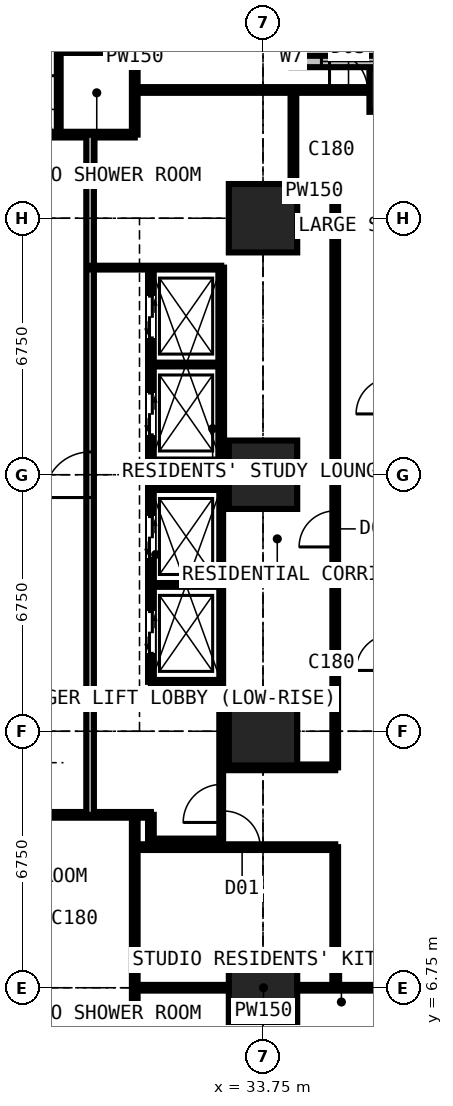
"""IFC4 building model, lengths in metres.
Left out: names, types, materials, properties, quantities, classifications, styles, units other than length and angle.
Written with IfcOpenShell. Run it as: python <this file> out.ifc"""

import sys

from ifc_helpers import new_model, si_unit, direction, frame, frame_2d, origin, origin_2d, place, context, subcontext, project, spatial, rectangle, extrude, element, fill, save


model = new_model("IFC4")
c1 = context("Model", 3, precision=1e-05, world=origin(), true_north=direction((0.0, 1.0)))
c2 = subcontext(c1, "Body", "Model", "MODEL_VIEW")
j1 = project(units=[si_unit("LENGTHUNIT", "METRE"), si_unit("PLANEANGLEUNIT", "RADIAN")], contexts=[c1])
p1 = place(None, origin())
s1 = spatial("IfcSite", under=j1, at=p1, CompositionType="ELEMENT")
p2 = place(p1, origin())
s2 = spatial("IfcBuilding", under=s1, at=p2, CompositionType="ELEMENT")
p3 = place(p2, frame((0.0, 0.0, 87.3)))
s3 = spatial("IfcBuildingStorey", under=s2, at=p3, CompositionType="ELEMENT", Elevation=87.3)
for number, where, z_axis, x_axis in (
    (1, (33.75, 6.75, 0.0), (0.0, 0.0, 1.0), (1.0, 0.0, 0.0)),
    (2, (33.75, 13.5, 0.0), (0.0, 0.0, 1.0), (1.0, 0.0, 0.0)),
    (3, (33.75, 20.25, 0.0), (0.0, 0.0, 1.0), (1.0, 0.0, 0.0)),
    (4, (33.75, 27.0, 0.0), (0.0, 0.0, 1.0), (1.0, 0.0, 0.0)),
):
    element("IfcColumn", number, at=place(p3, frame(where, z_axis=z_axis, x_axis=x_axis)), inside=s3, PredefinedType="COLUMN", context=c2, shape_type="SweptSolid", body=[
        extrude(rectangle(XDim=1.8, YDim=1.8, at=origin_2d()), origin(), (0.0, 0.0, 1.0), 3.6),
    ])
p4 = place(p3, frame((37.125, 30.375, 0.0), z_axis=(0.0, 0.0, 1.0), x_axis=(1.0, 0.0, 0.0)))
e5 = element("IfcColumn", 5, at=p4, inside=s3, PredefinedType="COLUMN", context=c2, shape_type="SweptSolid", body=[
    extrude(rectangle(XDim=1.15, YDim=1.15, at=origin_2d()), origin(), (0.0, 0.0, 1.0), 3.6),
])
p5 = place(p3, frame((37.875, 31.125, 0.0), z_axis=(0.0, 0.0, 1.0), x_axis=(-1.0, 0.0, 0.0)))
e6 = element("IfcWall", 6, at=p5, inside=s3, PredefinedType="SOLIDWALL", context=c2, shape_type="SweptSolid", body=[
    extrude(rectangle(XDim=3.375, YDim=0.3, at=frame_2d((1.688, 0.0))), origin(), (0.0, 0.0, 1.0), 3.375),
])
p6 = place(p5, frame((0.788, 0.0, 0.6)))
e7 = element("IfcOpeningElement", 7, at=p6, cuts=e6, PredefinedType="OPENING", context=c2, shape_type="SweptSolid", body=[
    extrude(rectangle(XDim=1.8, YDim=2.1, at=frame_2d((0.9, 1.05))), frame((0.0, 0.16, 0.0), z_axis=(0.0, -1.0, 0.0), x_axis=(1.0, 0.0, 0.0)), (0.0, 0.0, 1.0), 0.32),
])
p7 = place(p3, frame((34.5, 31.125, 0.0), z_axis=(0.0, 0.0, 1.0), x_axis=(0.0, 1.0, 0.0)))
e8 = element("IfcWall", 8, at=p7, inside=s3, PredefinedType="SOLIDWALL", context=c2, shape_type="SweptSolid", body=[
    extrude(rectangle(XDim=3.375, YDim=0.3, at=frame_2d((1.688, 0.0))), origin(), (0.0, 0.0, 1.0), 3.375),
])
p8 = place(p7, frame((0.272, 0.0, 0.9)))
e9 = element("IfcOpeningElement", 9, at=p8, cuts=e8, PredefinedType="OPENING", context=c2, shape_type="SweptSolid", body=[
    extrude(rectangle(XDim=0.9, YDim=1.8, at=frame_2d((0.45, 0.9))), frame((0.0, 0.16, 0.0), z_axis=(0.0, -1.0, 0.0), x_axis=(1.0, 0.0, 0.0)), (0.0, 0.0, 1.0), 0.32),
])
p9 = place(p3, frame((10.125, 11.3, 0.0), z_axis=(0.0, 0.0, 1.0), x_axis=(1.0, 0.0, 0.0)))
e10 = element("IfcWall", 10, at=p9, inside=s3, PredefinedType="PARTITIONING", context=c2, shape_type="SweptSolid", body=[
    extrude(rectangle(XDim=20.675, YDim=0.15, at=frame_2d((10.337, 0.0))), origin(), (0.0, 0.0, 1.0), 3.375),
])
p10 = place(p9, frame((8.375, 0.0, 0.0)))
e11 = element("IfcOpeningElement", 11, at=p10, cuts=e10, PredefinedType="OPENING", context=c2, shape_type="SweptSolid", body=[
    extrude(rectangle(XDim=1.0, YDim=2.2, at=frame_2d((0.5, 1.1))), frame((0.0, 0.085, 0.0), z_axis=(0.0, -1.0, 0.0), x_axis=(1.0, 0.0, 0.0)), (0.0, 0.0, 1.0), 0.17),
])
p11 = place(p9, frame((10.975, 0.0, 0.0)))
e12 = element("IfcOpeningElement", 12, at=p11, cuts=e10, PredefinedType="OPENING", context=c2, shape_type="SweptSolid", body=[
    extrude(rectangle(XDim=1.0, YDim=2.2, at=frame_2d((0.5, 1.1))), frame((0.0, 0.085, 0.0), z_axis=(0.0, -1.0, 0.0), x_axis=(1.0, 0.0, 0.0)), (0.0, 0.0, 1.0), 0.17),
])
p12 = place(p9, frame((3.925, 0.0, 0.0)))
e13 = element("IfcOpeningElement", 13, at=p12, cuts=e10, PredefinedType="OPENING", context=c2, shape_type="SweptSolid", body=[
    extrude(rectangle(XDim=0.95, YDim=2.2, at=frame_2d((0.475, 1.1))), frame((0.0, 0.085, 0.0), z_axis=(0.0, -1.0, 0.0), x_axis=(1.0, 0.0, 0.0)), (0.0, 0.0, 1.0), 0.17),
])
p13 = place(p3, frame((11.3, 29.2, 0.0), z_axis=(0.0, 0.0, 1.0), x_axis=(1.0, 0.0, 0.0)))
e14 = element("IfcWall", 14, at=p13, inside=s3, PredefinedType="PARTITIONING", context=c2, shape_type="SweptSolid", body=[
    extrude(rectangle(XDim=19.075, YDim=0.15, at=frame_2d((9.538, 0.0))), origin(), (0.0, 0.0, 1.0), 3.375),
])
p14 = place(p13, frame((5.825, 0.0, 0.0)))
e15 = element("IfcOpeningElement", 15, at=p14, cuts=e14, PredefinedType="OPENING", context=c2, shape_type="SweptSolid", body=[
    extrude(rectangle(XDim=0.95, YDim=2.2, at=frame_2d((0.475, 1.1))), frame((0.0, 0.085, 0.0), z_axis=(0.0, -1.0, 0.0), x_axis=(1.0, 0.0, 0.0)), (0.0, 0.0, 1.0), 0.17),
])
p15 = place(p13, frame((9.2, 0.0, 0.0)))
e16 = element("IfcOpeningElement", 16, at=p15, cuts=e14, PredefinedType="OPENING", context=c2, shape_type="SweptSolid", body=[
    extrude(rectangle(XDim=0.95, YDim=2.2, at=frame_2d((0.475, 1.1))), frame((0.0, 0.085, 0.0), z_axis=(0.0, -1.0, 0.0), x_axis=(1.0, 0.0, 0.0)), (0.0, 0.0, 1.0), 0.17),
])
p16 = place(p13, frame((12.575, 0.0, 0.0)))
e17 = element("IfcOpeningElement", 17, at=p16, cuts=e14, PredefinedType="OPENING", context=c2, shape_type="SweptSolid", body=[
    extrude(rectangle(XDim=0.95, YDim=2.2, at=frame_2d((0.475, 1.1))), frame((0.0, 0.085, 0.0), z_axis=(0.0, -1.0, 0.0), x_axis=(1.0, 0.0, 0.0)), (0.0, 0.0, 1.0), 0.17),
])
p17 = place(p13, frame((15.95, 0.0, 0.0)))
e18 = element("IfcOpeningElement", 18, at=p17, cuts=e14, PredefinedType="OPENING", context=c2, shape_type="SweptSolid", body=[
    extrude(rectangle(XDim=0.95, YDim=2.2, at=frame_2d((0.475, 1.1))), frame((0.0, 0.085, 0.0), z_axis=(0.0, -1.0, 0.0), x_axis=(1.0, 0.0, 0.0)), (0.0, 0.0, 1.0), 0.17),
])
p18 = place(p13, frame((0.6, 0.0, 0.0)))
e19 = element("IfcOpeningElement", 19, at=p18, cuts=e14, PredefinedType="OPENING", context=c2, shape_type="SweptSolid", body=[
    extrude(rectangle(XDim=1.0, YDim=2.2, at=frame_2d((0.5, 1.1))), frame((0.0, 0.085, 0.0), z_axis=(0.0, -1.0, 0.0), x_axis=(1.0, 0.0, 0.0)), (0.0, 0.0, 1.0), 0.17),
])
p19 = place(p3, frame((27.725, 5.95, 0.0), z_axis=(0.0, 0.0, 1.0), x_axis=(1.0, 0.0, 0.0)))
e20 = element("IfcWall", 20, at=p19, inside=s3, PredefinedType="PARTITIONING", context=c2, shape_type="SweptSolid", body=[
    extrude(rectangle(XDim=2.65, YDim=0.15, at=frame_2d((1.325, 0.0))), origin(), (0.0, 0.0, 1.0), 3.375),
])
p20 = place(p3, frame((28.375, 29.2, 0.0), z_axis=(0.0, 0.0, 1.0), x_axis=(0.0, 1.0, 0.0)))
e21 = element("IfcWall", 21, at=p20, inside=s3, PredefinedType="PARTITIONING", context=c2, shape_type="SweptSolid", body=[
    extrude(rectangle(XDim=2.2, YDim=0.1, at=frame_2d((1.1, 0.0))), origin(), (0.0, 0.0, 1.0), 3.375),
])
p21 = place(p20, frame((0.65, 0.0, 0.0)))
e22 = element("IfcOpeningElement", 22, at=p21, cuts=e21, PredefinedType="OPENING", context=c2, shape_type="SweptSolid", body=[
    extrude(rectangle(XDim=0.9, YDim=2.2, at=frame_2d((0.45, 1.1))), frame((0.0, 0.06, 0.0), z_axis=(0.0, -1.0, 0.0), x_axis=(1.0, 0.0, 0.0)), (0.0, 0.0, 1.0), 0.12),
])
p22 = place(p3, frame((28.375, 31.4, 0.0), z_axis=(0.0, 0.0, 1.0), x_axis=(1.0, 0.0, 0.0)))
e23 = element("IfcWall", 23, at=p22, inside=s3, PredefinedType="PARTITIONING", context=c2, shape_type="SweptSolid", body=[
    extrude(rectangle(XDim=2.0, YDim=0.1, at=frame_2d((1.0, 0.0))), origin(), (0.0, 0.0, 1.0), 3.375),
])
p23 = place(p3, frame((29.2, 11.3, 0.0), z_axis=(0.0, 0.0, 1.0), x_axis=(0.0, 1.0, 0.0)))
e24 = element("IfcWall", 24, at=p23, inside=s3, PredefinedType="PARTITIONING", context=c2, shape_type="SweptSolid", body=[
    extrude(rectangle(XDim=17.9, YDim=0.2, at=frame_2d((8.95, 0.0))), origin(), (0.0, 0.0, 1.0), 3.375),
])
p24 = place(p23, frame((8.35, 0.0, 0.0)))
e25 = element("IfcOpeningElement", 25, at=p24, cuts=e24, PredefinedType="OPENING", context=c2, shape_type="SweptSolid", body=[
    extrude(rectangle(XDim=1.2, YDim=2.2, at=frame_2d((0.6, 1.1))), frame((0.0, 0.11, 0.0), z_axis=(0.0, -1.0, 0.0), x_axis=(1.0, 0.0, 0.0)), (0.0, 0.0, 1.0), 0.22),
])
p25 = place(p3, frame((29.2, 25.7, 0.0), z_axis=(0.0, 0.0, 1.0), x_axis=(1.0, 0.0, 0.0)))
e26 = element("IfcWall", 26, at=p25, inside=s3, PredefinedType="SHEAR", context=c2, shape_type="SweptSolid", body=[
    extrude(rectangle(XDim=3.45, YDim=0.1, at=frame_2d((1.725, 0.0))), origin(), (0.0, 0.0, 1.0), 3.375),
])
p26 = place(p3, frame((30.375, -0.734, 0.0), z_axis=(0.0, 0.0, 1.0), x_axis=(0.0, 1.0, 0.0)))
e27 = element("IfcWall", 27, at=p26, inside=s3, PredefinedType="PARTITIONING", context=c2, shape_type="SweptSolid", body=[
    extrude(rectangle(XDim=12.034, YDim=0.15, at=frame_2d((6.017, 0.0))), origin(), (0.0, 0.0, 1.0), 3.375),
])
p27 = place(p26, frame((4.884, 0.0, 0.0)))
e28 = element("IfcOpeningElement", 28, at=p27, cuts=e27, PredefinedType="OPENING", context=c2, shape_type="SweptSolid", body=[
    extrude(rectangle(XDim=1.0, YDim=2.2, at=frame_2d((0.5, 1.1))), frame((0.0, 0.085, 0.0), z_axis=(0.0, -1.0, 0.0), x_axis=(1.0, 0.0, 0.0)), (0.0, 0.0, 1.0), 0.17),
])
p28 = place(p3, frame((30.375, 6.75, 0.0), z_axis=(0.0, 0.0, 1.0), x_axis=(1.0, 0.0, 0.0)))
e29 = element("IfcWall", 29, at=p28, inside=s3, PredefinedType="PARTITIONING", context=c2, shape_type="SweptSolid", body=[
    extrude(rectangle(XDim=6.775, YDim=0.15, at=frame_2d((3.387, 0.0))), origin(), (0.0, 0.0, 1.0), 2.877),
])
p29 = place(p3, frame((30.375, 10.45, 0.0), z_axis=(0.0, 0.0, 1.0), x_axis=(1.0, 0.0, 0.0)))
e30 = element("IfcWall", 30, at=p29, inside=s3, PredefinedType="PARTITIONING", context=c2, shape_type="SweptSolid", body=[
    extrude(rectangle(XDim=5.275, YDim=0.15, at=frame_2d((2.637, 0.0))), origin(), (0.0, 0.0, 1.0), 3.375),
])
p30 = place(p29, frame((2.35, 0.0, 0.0)))
e31 = element("IfcOpeningElement", 31, at=p30, cuts=e30, PredefinedType="OPENING", context=c2, shape_type="SweptSolid", body=[
    extrude(rectangle(XDim=0.95, YDim=2.2, at=frame_2d((0.475, 1.1))), frame((0.0, 0.085, 0.0), z_axis=(0.0, -1.0, 0.0), x_axis=(1.0, 0.0, 0.0)), (0.0, 0.0, 1.0), 0.17),
])
p31 = place(p3, frame((30.375, 29.2, 0.0), z_axis=(0.0, 0.0, 1.0), x_axis=(0.0, 1.0, 0.0)))
e32 = element("IfcWall", 32, at=p31, inside=s3, PredefinedType="PARTITIONING", context=c2, shape_type="SweptSolid", body=[
    extrude(rectangle(XDim=5.284, YDim=0.15, at=frame_2d((2.642, 0.0))), origin(), (0.0, 0.0, 1.0), 3.375),
])
p32 = place(p3, frame((30.375, 30.375, 0.0), z_axis=(0.0, 0.0, 1.0), x_axis=(1.0, 0.0, 0.0)))
e33 = element("IfcWall", 33, at=p32, inside=s3, PredefinedType="PARTITIONING", context=c2, shape_type="SweptSolid", body=[
    extrude(rectangle(XDim=7.35, YDim=0.15, at=frame_2d((3.675, 0.0))), origin(), (0.0, 0.0, 1.0), 2.877),
])
p33 = place(p32, frame((5.125, 0.0, 0.0)))
e34 = element("IfcOpeningElement", 34, at=p33, cuts=e33, PredefinedType="OPENING", context=c2, shape_type="SweptSolid", body=[
    extrude(rectangle(XDim=1.0, YDim=2.2, at=frame_2d((0.5, 1.1))), frame((0.0, 0.085, 0.0), z_axis=(0.0, -1.0, 0.0), x_axis=(1.0, 0.0, 0.0)), (0.0, 0.0, 1.0), 0.17),
])
p34 = place(p3, frame((30.8, 10.6, 0.0), z_axis=(0.0, 0.0, 1.0), x_axis=(0.0, 1.0, 0.0)))
e35 = element("IfcWall", 35, at=p34, inside=s3, PredefinedType="PARTITIONING", context=c2, shape_type="SweptSolid", body=[
    extrude(rectangle(XDim=0.7, YDim=0.15, at=frame_2d((0.35, 0.0))), origin(), (0.0, 0.0, 1.0), 3.375),
])
p35 = place(p3, frame((30.8, 10.6, 0.0), z_axis=(0.0, 0.0, 1.0), x_axis=(1.0, 0.0, 0.0)))
e36 = element("IfcWall", 36, at=p35, inside=s3, PredefinedType="PARTITIONING", context=c2, shape_type="SweptSolid", body=[
    extrude(rectangle(XDim=1.85, YDim=0.15, at=frame_2d((0.925, 0.0))), origin(), (0.0, 0.0, 1.0), 3.375),
])
p36 = place(p3, frame((30.8, 14.8, 0.0), z_axis=(0.0, 0.0, 1.0), x_axis=(0.0, 1.0, 0.0)))
e37 = element("IfcWall", 37, at=p36, inside=s3, PredefinedType="PARTITIONING", context=c2, shape_type="SweptSolid", body=[
    extrude(rectangle(XDim=10.9, YDim=0.15, at=frame_2d((5.45, 0.0))), origin(), (0.0, 0.0, 1.0), 3.375),
])
p37 = place(p36, frame((0.75, 0.0, 0.0)))
e38 = element("IfcOpeningElement", 38, at=p37, cuts=e37, PredefinedType="OPENING", context=c2, shape_type="SweptSolid", body=[
    extrude(rectangle(XDim=1.1, YDim=2.2, at=frame_2d((0.55, 1.1))), frame((0.0, 0.085, 0.0), z_axis=(0.0, -1.0, 0.0), x_axis=(1.0, 0.0, 0.0)), (0.0, 0.0, 1.0), 0.17),
])
p38 = place(p36, frame((3.25, 0.0, 0.0)))
e39 = element("IfcOpeningElement", 39, at=p38, cuts=e37, PredefinedType="OPENING", context=c2, shape_type="SweptSolid", body=[
    extrude(rectangle(XDim=1.1, YDim=2.2, at=frame_2d((0.55, 1.1))), frame((0.0, 0.085, 0.0), z_axis=(0.0, -1.0, 0.0), x_axis=(1.0, 0.0, 0.0)), (0.0, 0.0, 1.0), 0.17),
])
p39 = place(p36, frame((6.5, 0.0, 0.0)))
e40 = element("IfcOpeningElement", 40, at=p39, cuts=e37, PredefinedType="OPENING", context=c2, shape_type="SweptSolid", body=[
    extrude(rectangle(XDim=1.1, YDim=2.2, at=frame_2d((0.55, 1.1))), frame((0.0, 0.085, 0.0), z_axis=(0.0, -1.0, 0.0), x_axis=(1.0, 0.0, 0.0)), (0.0, 0.0, 1.0), 0.17),
])
p40 = place(p36, frame((9.05, 0.0, 0.0)))
e41 = element("IfcOpeningElement", 41, at=p40, cuts=e37, PredefinedType="OPENING", context=c2, shape_type="SweptSolid", body=[
    extrude(rectangle(XDim=1.1, YDim=2.2, at=frame_2d((0.55, 1.1))), frame((0.0, 0.085, 0.0), z_axis=(0.0, -1.0, 0.0), x_axis=(1.0, 0.0, 0.0)), (0.0, 0.0, 1.0), 0.17),
])
for number, where, z_axis, x_axis in (
    (42, (30.8, 14.8, 0.0), (0.0, 0.0, 1.0), (1.0, 0.0, 0.0)),
    (43, (30.8, 17.35, 0.0), (0.0, 0.0, 1.0), (1.0, 0.0, 0.0)),
    (44, (30.8, 19.9, 0.0), (0.0, 0.0, 1.0), (1.0, 0.0, 0.0)),
    (45, (30.8, 20.6, 0.0), (0.0, 0.0, 1.0), (1.0, 0.0, 0.0)),
    (46, (30.8, 23.15, 0.0), (0.0, 0.0, 1.0), (1.0, 0.0, 0.0)),
):
    element("IfcWall", number, at=place(p3, frame(where, z_axis=z_axis, x_axis=x_axis)), inside=s3, PredefinedType="SHEAR", context=c2, shape_type="SweptSolid", body=[
        extrude(rectangle(XDim=1.85, YDim=0.1, at=frame_2d((0.925, 0.0))), origin(), (0.0, 0.0, 1.0), 3.375),
    ])
p41 = place(p3, frame((32.65, 10.6, 0.0), z_axis=(0.0, 0.0, 1.0), x_axis=(0.0, 1.0, 0.0)))
e47 = element("IfcWall", 47, at=p41, inside=s3, PredefinedType="SHEAR", context=c2, shape_type="SweptSolid", body=[
    extrude(rectangle(XDim=9.3, YDim=0.1, at=frame_2d((4.65, 0.0))), origin(), (0.0, 0.0, 1.0), 3.375),
])
p42 = place(p41, frame((0.5, 0.0, 0.0)))
e48 = element("IfcOpeningElement", 48, at=p42, cuts=e47, PredefinedType="OPENING", context=c2, shape_type="SweptSolid", body=[
    extrude(rectangle(XDim=1.0, YDim=2.2, at=frame_2d((0.5, 1.1))), frame((0.0, 0.06, 0.0), z_axis=(0.0, -1.0, 0.0), x_axis=(1.0, 0.0, 0.0)), (0.0, 0.0, 1.0), 0.12),
])
p43 = place(p3, frame((32.65, 12.55, 0.0), z_axis=(0.0, 0.0, 1.0), x_axis=(1.0, 0.0, 0.0)))
e49 = element("IfcWall", 49, at=p43, inside=s3, PredefinedType="PARTITIONING", context=c2, shape_type="SweptSolid", body=[
    extrude(rectangle(XDim=3.0, YDim=0.15, at=frame_2d((1.5, 0.0))), origin(), (0.0, 0.0, 1.0), 3.375),
])
p44 = place(p3, frame((32.65, 20.6, 0.0), z_axis=(0.0, 0.0, 1.0), x_axis=(0.0, 1.0, 0.0)))
e50 = element("IfcWall", 50, at=p44, inside=s3, PredefinedType="PARTITIONING", context=c2, shape_type="SweptSolid", body=[
    extrude(rectangle(XDim=5.1, YDim=0.15, at=frame_2d((2.55, 0.0))), origin(), (0.0, 0.0, 1.0), 3.375),
])
p45 = place(p3, frame((34.55, 27.725, 0.0), z_axis=(0.0, 0.0, 1.0), x_axis=(0.0, 1.0, 0.0)))
e51 = element("IfcWall", 51, at=p45, inside=s3, PredefinedType="PARTITIONING", context=c2, shape_type="SweptSolid", body=[
    extrude(rectangle(XDim=2.65, YDim=0.15, at=frame_2d((1.325, 0.0))), origin(), (0.0, 0.0, 1.0), 3.375),
])
p46 = place(p3, frame((34.55, 27.725, 0.0), z_axis=(0.0, 0.0, 1.0), x_axis=(1.0, 0.0, 0.0)))
e52 = element("IfcWall", 52, at=p46, inside=s3, PredefinedType="PARTITIONING", context=c2, shape_type="SweptSolid", body=[
    extrude(rectangle(XDim=1.1, YDim=0.15, at=frame_2d((0.55, 0.0))), origin(), (0.0, 0.0, 1.0), 3.375),
])
p47 = place(p3, frame((35.65, 6.75, 0.0), z_axis=(0.0, 0.0, 1.0), x_axis=(0.0, 1.0, 0.0)))
e53 = element("IfcWall", 53, at=p47, inside=s3, PredefinedType="PARTITIONING", context=c2, shape_type="SweptSolid", body=[
    extrude(rectangle(XDim=3.7, YDim=0.15, at=frame_2d((1.85, 0.0))), origin(), (0.0, 0.0, 1.0), 3.375),
])
p48 = place(p3, frame((35.65, 12.55, 0.0), z_axis=(0.0, 0.0, 1.0), x_axis=(0.0, 1.0, 0.0)))
e54 = element("IfcWall", 54, at=p48, inside=s3, PredefinedType="PARTITIONING", context=c2, shape_type="SweptSolid", body=[
    extrude(rectangle(XDim=15.175, YDim=0.15, at=frame_2d((7.587, 0.0))), origin(), (0.0, 0.0, 1.0), 3.375),
])
p49 = place(p48, frame((5.8, 0.0, 0.0)))
e55 = element("IfcOpeningElement", 55, at=p49, cuts=e54, PredefinedType="OPENING", context=c2, shape_type="SweptSolid", body=[
    extrude(rectangle(XDim=0.95, YDim=2.2, at=frame_2d((0.475, 1.1))), frame((0.0, 0.085, 0.0), z_axis=(0.0, -1.0, 0.0), x_axis=(1.0, 0.0, 0.0)), (0.0, 0.0, 1.0), 0.17),
])
p50 = place(p6, origin())
e56 = element("IfcWindow", 56, at=p50, inside=s3, PartitioningType="SINGLE_PANEL", PredefinedType="WINDOW", context=c2, shape_type="SweptSolid", body=[
    extrude(rectangle(XDim=1.8, YDim=2.1, at=frame_2d((0.9, 1.05))), frame((0.0, 0.03, 0.0), z_axis=(0.0, -1.0, 0.0), x_axis=(1.0, 0.0, 0.0)), (0.0, 0.0, 1.0), 0.06),
])
fill(e7, e56)
p51 = place(p42, origin())
e57 = element("IfcDoor", 57, at=p51, inside=s3, OperationType="SINGLE_SWING_LEFT", PredefinedType="DOOR", context=c2, shape_type="SweptSolid", body=[
    extrude(rectangle(XDim=1.0, YDim=2.2, at=frame_2d((0.5, 1.1))), frame((0.0, 0.025, 0.0), z_axis=(0.0, -1.0, 0.0), x_axis=(1.0, 0.0, 0.0)), (0.0, 0.0, 1.0), 0.05),
])
fill(e48, e57)
p52 = place(p49, origin())
e58 = element("IfcDoor", 58, at=p52, inside=s3, OperationType="SINGLE_SWING_LEFT", PredefinedType="DOOR", context=c2, shape_type="SweptSolid", body=[
    extrude(rectangle(XDim=0.95, YDim=2.2, at=frame_2d((0.475, 1.1))), frame((0.0, 0.025, 0.0), z_axis=(0.0, -1.0, 0.0), x_axis=(1.0, 0.0, 0.0)), (0.0, 0.0, 1.0), 0.05),
])
fill(e55, e58)
p53 = place(p30, origin())
e59 = element("IfcDoor", 59, at=p53, inside=s3, OperationType="SINGLE_SWING_LEFT", PredefinedType="DOOR", context=c2, shape_type="SweptSolid", body=[
    extrude(rectangle(XDim=0.95, YDim=2.2, at=frame_2d((0.475, 1.1))), frame((0.0, 0.025, 0.0), z_axis=(0.0, -1.0, 0.0), x_axis=(1.0, 0.0, 0.0)), (0.0, 0.0, 1.0), 0.05),
])
fill(e31, e59)
p54 = place(p33, origin())
e60 = element("IfcDoor", 60, at=p54, inside=s3, OperationType="SINGLE_SWING_LEFT", PredefinedType="DOOR", context=c2, shape_type="SweptSolid", body=[
    extrude(rectangle(XDim=1.0, YDim=2.2, at=frame_2d((0.5, 1.1))), frame((0.0, 0.025, 0.0), z_axis=(0.0, -1.0, 0.0), x_axis=(1.0, 0.0, 0.0)), (0.0, 0.0, 1.0), 0.05),
])
fill(e34, e60)
p55 = place(p17, origin())
e61 = element("IfcDoor", 61, at=p55, inside=s3, OperationType="SINGLE_SWING_LEFT", PredefinedType="DOOR", context=c2, shape_type="SweptSolid", body=[
    extrude(rectangle(XDim=0.95, YDim=2.2, at=frame_2d((0.475, 1.1))), frame((0.0, 0.025, 0.0), z_axis=(0.0, -1.0, 0.0), x_axis=(1.0, 0.0, 0.0)), (0.0, 0.0, 1.0), 0.05),
])
fill(e18, e61)
p56 = place(p21, origin())
e62 = element("IfcDoor", 62, at=p56, inside=s3, OperationType="SINGLE_SWING_RIGHT", PredefinedType="DOOR", context=c2, shape_type="SweptSolid", body=[
    extrude(rectangle(XDim=0.9, YDim=2.2, at=frame_2d((0.45, 1.1))), frame((0.0, 0.025, 0.0), z_axis=(0.0, -1.0, 0.0), x_axis=(1.0, 0.0, 0.0)), (0.0, 0.0, 1.0), 0.05),
])
fill(e22, e62)
p57 = place(p37, origin())
e63 = element("IfcDoor", 63, at=p57, inside=s3, OperationType="DOUBLE_DOOR_SLIDING", PredefinedType="DOOR", context=c2, shape_type="SweptSolid", body=[
    extrude(rectangle(XDim=1.1, YDim=2.2, at=frame_2d((0.55, 1.1))), frame((0.0, 0.025, 0.0), z_axis=(0.0, -1.0, 0.0), x_axis=(1.0, 0.0, 0.0)), (0.0, 0.0, 1.0), 0.05),
])
fill(e38, e63)
p58 = place(p38, origin())
e64 = element("IfcDoor", 64, at=p58, inside=s3, OperationType="DOUBLE_DOOR_SLIDING", PredefinedType="DOOR", context=c2, shape_type="SweptSolid", body=[
    extrude(rectangle(XDim=1.1, YDim=2.2, at=frame_2d((0.55, 1.1))), frame((0.0, 0.025, 0.0), z_axis=(0.0, -1.0, 0.0), x_axis=(1.0, 0.0, 0.0)), (0.0, 0.0, 1.0), 0.05),
])
fill(e39, e64)
p59 = place(p39, origin())
e65 = element("IfcDoor", 65, at=p59, inside=s3, OperationType="DOUBLE_DOOR_SLIDING", PredefinedType="DOOR", context=c2, shape_type="SweptSolid", body=[
    extrude(rectangle(XDim=1.1, YDim=2.2, at=frame_2d((0.55, 1.1))), frame((0.0, 0.025, 0.0), z_axis=(0.0, -1.0, 0.0), x_axis=(1.0, 0.0, 0.0)), (0.0, 0.0, 1.0), 0.05),
])
fill(e40, e65)
p60 = place(p40, origin())
e66 = element("IfcDoor", 66, at=p60, inside=s3, OperationType="DOUBLE_DOOR_SLIDING", PredefinedType="DOOR", context=c2, shape_type="SweptSolid", body=[
    extrude(rectangle(XDim=1.1, YDim=2.2, at=frame_2d((0.55, 1.1))), frame((0.0, 0.025, 0.0), z_axis=(0.0, -1.0, 0.0), x_axis=(1.0, 0.0, 0.0)), (0.0, 0.0, 1.0), 0.05),
])
fill(e41, e66)
p61 = place(p24, origin())
e67 = element("IfcDoor", 67, at=p61, inside=s3, OperationType="DOUBLE_DOOR_SINGLE_SWING", PredefinedType="DOOR", context=c2, shape_type="SweptSolid", body=[
    extrude(rectangle(XDim=1.2, YDim=2.2, at=frame_2d((0.6, 1.1))), frame((0.0, 0.025, 0.0), z_axis=(0.0, -1.0, 0.0), x_axis=(1.0, 0.0, 0.0)), (0.0, 0.0, 1.0), 0.05),
])
fill(e25, e67)
save(model, sys.argv[1])
